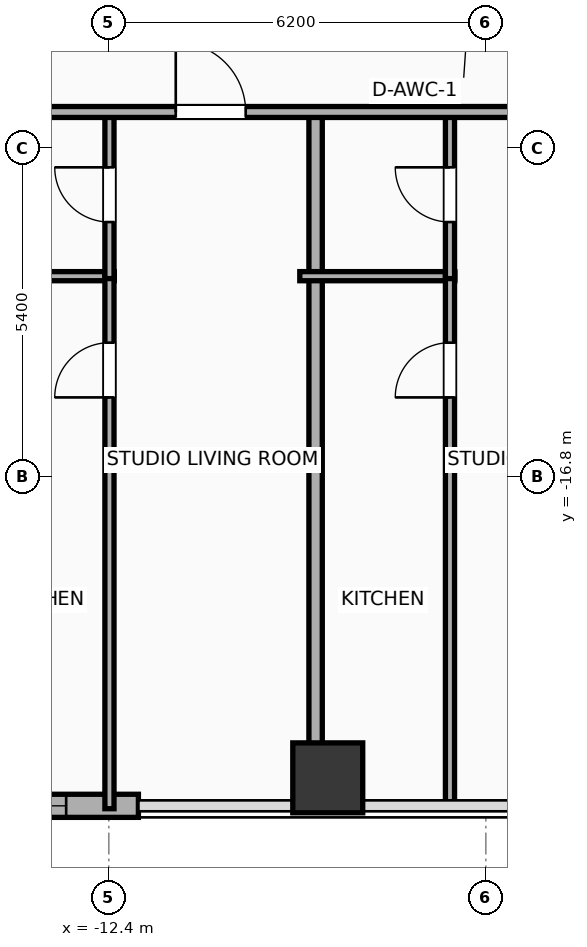
"""IFC4 building model, lengths in metres.
Left out: names, types, materials, properties, quantities, classifications, styles, units other than length and angle.
Written with IfcOpenShell. Run it as: python <this file> out.ifc"""

import sys

from ifc_helpers import new_model, si_unit, direction, frame, frame_2d, origin, origin_2d, place, context, subcontext, project, spatial, rectangle, hollow_rectangle, extrude, element, fill, save


model = new_model("IFC4")
c1 = context("Model", 3, precision=1e-05, world=origin(), true_north=direction((0.0, 1.0)))
c2 = subcontext(c1, "Body", "Model", "MODEL_VIEW")
j1 = project(units=[si_unit("LENGTHUNIT", "METRE"), si_unit("PLANEANGLEUNIT", "RADIAN")], contexts=[c1])
p1 = place(None, origin())
s1 = spatial("IfcSite", under=j1, at=p1, CompositionType="ELEMENT")
p2 = place(p1, origin())
s2 = spatial("IfcBuilding", under=s1, at=p2, CompositionType="ELEMENT")
p3 = place(p2, frame((0.0, 0.0, 61.1)))
s3 = spatial("IfcBuildingStorey", under=s2, at=p3, CompositionType="ELEMENT", Elevation=61.1)
p4 = place(p3, frame((-8.8, -21.75, 0.0), z_axis=(0.0, 0.0, 1.0), x_axis=(1.0, 0.0, 0.0)))
e1 = element("IfcColumn", 1, at=p4, inside=s3, PredefinedType="COLUMN", context=c2, shape_type="SweptSolid", body=[
    extrude(hollow_rectangle(XDim=1.15, YDim=1.15, WallThickness=0.04, at=origin_2d()), origin(), (0.0, 0.0, 1.0), 3.9),
])
p5 = place(p3, frame((-11.914, -22.21, 0.0), z_axis=(0.0, 0.0, 1.0), x_axis=(-1.0, 0.0, 0.0)))
e2 = element("IfcWall", 2, at=p5, inside=s3, PredefinedType="ELEMENTEDWALL", context=c2, shape_type="SweptSolid", body=[
    extrude(rectangle(XDim=17.667, YDim=0.38, at=frame_2d((8.833, 0.0))), origin(), (0.0, 0.0, 1.0), 3.65),
])
p6 = place(p5, frame((8.484, 0.0, 0.75)))
e3 = element("IfcOpeningElement", 3, at=p6, cuts=e2, PredefinedType="OPENING", context=c2, shape_type="SweptSolid", body=[
    extrude(rectangle(XDim=2.4, YDim=2.1, at=frame_2d((1.2, 1.05))), frame((0.0, 0.2, 0.0), z_axis=(0.0, -1.0, 0.0), x_axis=(1.0, 0.0, 0.0)), (0.0, 0.0, 1.0), 0.4),
])
p7 = place(p5, frame((14.732, 0.0, 0.75)))
e4 = element("IfcOpeningElement", 4, at=p7, cuts=e2, PredefinedType="OPENING", context=c2, shape_type="SweptSolid", body=[
    extrude(rectangle(XDim=1.2, YDim=2.05, at=frame_2d((0.6, 1.025))), frame((0.0, 0.2, 0.0), z_axis=(0.0, -1.0, 0.0), x_axis=(1.0, 0.0, 0.0)), (0.0, 0.0, 1.0), 0.4),
])
p8 = place(p5, frame((12.181, 0.0, 0.75)))
e5 = element("IfcOpeningElement", 5, at=p8, cuts=e2, PredefinedType="OPENING", context=c2, shape_type="SweptSolid", body=[
    extrude(rectangle(XDim=1.2, YDim=2.05, at=frame_2d((0.6, 1.025))), frame((0.0, 0.2, 0.0), z_axis=(0.0, -1.0, 0.0), x_axis=(1.0, 0.0, 0.0)), (0.0, 0.0, 1.0), 0.4),
])
p9 = place(p5, frame((4.886, 0.0, 0.75)))
e6 = element("IfcOpeningElement", 6, at=p9, cuts=e2, PredefinedType="OPENING", context=c2, shape_type="SweptSolid", body=[
    extrude(rectangle(XDim=1.2, YDim=2.05, at=frame_2d((0.6, 1.025))), frame((0.0, 0.2, 0.0), z_axis=(0.0, -1.0, 0.0), x_axis=(1.0, 0.0, 0.0)), (0.0, 0.0, 1.0), 0.4),
])
p10 = place(p5, frame((1.188, 0.0, 0.75)))
e7 = element("IfcOpeningElement", 7, at=p10, cuts=e2, PredefinedType="OPENING", context=c2, shape_type="SweptSolid", body=[
    extrude(rectangle(XDim=1.2, YDim=2.05, at=frame_2d((0.6, 1.025))), frame((0.0, 0.2, 0.0), z_axis=(0.0, -1.0, 0.0), x_axis=(1.0, 0.0, 0.0)), (0.0, 0.0, 1.0), 0.4),
])
p11 = place(p3, frame((-14.86, -13.5, 0.0), z_axis=(0.0, 0.0, 1.0), x_axis=(1.0, 0.0, 0.0)))
e8 = element("IfcWall", 8, at=p11, inside=s3, PredefinedType="PLUMBINGWALL", context=c2, shape_type="SweptSolid", body=[
    extrude(rectangle(XDim=2.55, YDim=0.15, at=frame_2d((1.275, 0.0))), origin(), (0.0, 0.0, 1.0), 3.65),
])
p12 = place(p3, frame((-12.39, -22.258, 0.0), z_axis=(0.0, 0.0, 1.0), x_axis=(0.0, 1.0, 0.0)))
e9 = element("IfcWall", 9, at=p12, inside=s3, PredefinedType="PLUMBINGWALL", context=c2, shape_type="SweptSolid", body=[
    extrude(rectangle(XDim=8.798, YDim=0.15, at=frame_2d((4.399, 0.0))), origin(), (0.0, 0.0, 1.0), 3.65),
])
p13 = place(p12, frame((6.764, 0.0, 0.0)))
e10 = element("IfcOpeningElement", 10, at=p13, cuts=e9, PredefinedType="OPENING", context=c2, shape_type="SweptSolid", body=[
    extrude(rectangle(XDim=0.9, YDim=2.05, at=frame_2d((0.45, 1.025))), frame((0.0, 0.085, 0.0), z_axis=(0.0, -1.0, 0.0), x_axis=(1.0, 0.0, 0.0)), (0.0, 0.0, 1.0), 0.17),
])
p14 = place(p3, frame((-12.39, -13.54, 0.0), z_axis=(0.0, 0.0, 1.0), x_axis=(0.0, 1.0, 0.0)))
e11 = element("IfcWall", 11, at=p14, inside=s3, PredefinedType="PLUMBINGWALL", context=c2, shape_type="SweptSolid", body=[
    extrude(rectangle(XDim=2.76, YDim=0.15, at=frame_2d((1.38, 0.0))), origin(), (0.0, 0.0, 1.0), 3.65),
])
p15 = place(p14, frame((0.93, 0.0, 0.0)))
e12 = element("IfcOpeningElement", 12, at=p15, cuts=e11, PredefinedType="OPENING", context=c2, shape_type="SweptSolid", body=[
    extrude(rectangle(XDim=0.9, YDim=2.05, at=frame_2d((0.45, 1.025))), frame((0.0, 0.085, 0.0), z_axis=(0.0, -1.0, 0.0), x_axis=(1.0, 0.0, 0.0)), (0.0, 0.0, 1.0), 0.17),
])
p16 = place(p3, frame((-9.0, -22.21, 0.0), z_axis=(0.0, 0.0, 1.0), x_axis=(0.0, 1.0, 0.0)))
e13 = element("IfcWall", 13, at=p16, inside=s3, PredefinedType="PARTITIONING", context=c2, shape_type="SweptSolid", body=[
    extrude(rectangle(XDim=11.49, YDim=0.22, at=frame_2d((5.745, 0.0))), origin(), (0.0, 0.0, 1.0), 2.94),
])
p17 = place(p3, frame((-9.26, -13.5, 0.0), z_axis=(0.0, 0.0, 1.0), x_axis=(1.0, 0.0, 0.0)))
e14 = element("IfcWall", 14, at=p17, inside=s3, PredefinedType="PLUMBINGWALL", context=c2, shape_type="SweptSolid", body=[
    extrude(rectangle(XDim=2.55, YDim=0.15, at=frame_2d((1.275, 0.0))), origin(), (0.0, 0.0, 1.0), 3.65),
])
p18 = place(p3, frame((-6.79, -22.258, 0.0), z_axis=(0.0, 0.0, 1.0), x_axis=(0.0, 1.0, 0.0)))
e15 = element("IfcWall", 15, at=p18, inside=s3, PredefinedType="PLUMBINGWALL", context=c2, shape_type="SweptSolid", body=[
    extrude(rectangle(XDim=8.798, YDim=0.15, at=frame_2d((4.399, 0.0))), origin(), (0.0, 0.0, 1.0), 3.65),
])
p19 = place(p18, frame((6.764, 0.0, 0.0)))
e16 = element("IfcOpeningElement", 16, at=p19, cuts=e15, PredefinedType="OPENING", context=c2, shape_type="SweptSolid", body=[
    extrude(rectangle(XDim=0.9, YDim=2.05, at=frame_2d((0.45, 1.025))), frame((0.0, 0.085, 0.0), z_axis=(0.0, -1.0, 0.0), x_axis=(1.0, 0.0, 0.0)), (0.0, 0.0, 1.0), 0.17),
])
p20 = place(p3, frame((-6.79, -13.54, 0.0), z_axis=(0.0, 0.0, 1.0), x_axis=(0.0, 1.0, 0.0)))
e17 = element("IfcWall", 17, at=p20, inside=s3, PredefinedType="PLUMBINGWALL", context=c2, shape_type="SweptSolid", body=[
    extrude(rectangle(XDim=2.76, YDim=0.15, at=frame_2d((1.38, 0.0))), origin(), (0.0, 0.0, 1.0), 3.65),
])
p21 = place(p20, frame((0.93, 0.0, 0.0)))
e18 = element("IfcOpeningElement", 18, at=p21, cuts=e17, PredefinedType="OPENING", context=c2, shape_type="SweptSolid", body=[
    extrude(rectangle(XDim=0.9, YDim=2.05, at=frame_2d((0.45, 1.025))), frame((0.0, 0.085, 0.0), z_axis=(0.0, -1.0, 0.0), x_axis=(1.0, 0.0, 0.0)), (0.0, 0.0, 1.0), 0.17),
])
p22 = place(p3, frame((-33.41, -10.8, 0.0), z_axis=(0.0, 0.0, 1.0), x_axis=(1.0, 0.0, 0.0)))
e19 = element("IfcWall", 19, at=p22, inside=s3, PredefinedType="PARTITIONING", context=c2, shape_type="SweptSolid", body=[
    extrude(rectangle(XDim=59.62, YDim=0.18, at=frame_2d((29.81, 0.0))), origin(), (0.0, 0.0, 1.0), 3.65),
])
p23 = place(p22, frame((3.36, 0.0, 0.0)))
e20 = element("IfcOpeningElement", 20, at=p23, cuts=e19, PredefinedType="OPENING", context=c2, shape_type="SweptSolid", body=[
    extrude(rectangle(XDim=1.15, YDim=2.05, at=frame_2d((0.575, 1.025))), frame((0.0, 0.1, 0.0), z_axis=(0.0, -1.0, 0.0), x_axis=(1.0, 0.0, 0.0)), (0.0, 0.0, 1.0), 0.2),
])
p24 = place(p22, frame((10.908, 0.0, 0.0)))
e21 = element("IfcOpeningElement", 21, at=p24, cuts=e19, PredefinedType="OPENING", context=c2, shape_type="SweptSolid", body=[
    extrude(rectangle(XDim=1.15, YDim=2.05, at=frame_2d((0.575, 1.025))), frame((0.0, 0.1, 0.0), z_axis=(0.0, -1.0, 0.0), x_axis=(1.0, 0.0, 0.0)), (0.0, 0.0, 1.0), 0.2),
])
p25 = place(p22, frame((15.755, 0.0, 0.0)))
e22 = element("IfcOpeningElement", 22, at=p25, cuts=e19, PredefinedType="OPENING", context=c2, shape_type="SweptSolid", body=[
    extrude(rectangle(XDim=0.9, YDim=2.05, at=frame_2d((0.45, 1.025))), frame((0.0, 0.1, 0.0), z_axis=(0.0, -1.0, 0.0), x_axis=(1.0, 0.0, 0.0)), (0.0, 0.0, 1.0), 0.2),
])
p26 = place(p22, frame((22.11, 0.0, 0.0)))
e23 = element("IfcOpeningElement", 23, at=p26, cuts=e19, PredefinedType="OPENING", context=c2, shape_type="SweptSolid", body=[
    extrude(rectangle(XDim=1.15, YDim=2.05, at=frame_2d((0.575, 1.025))), frame((0.0, 0.1, 0.0), z_axis=(0.0, -1.0, 0.0), x_axis=(1.0, 0.0, 0.0)), (0.0, 0.0, 1.0), 0.2),
])
p27 = place(p22, frame((27.709, 0.0, 0.0)))
e24 = element("IfcOpeningElement", 24, at=p27, cuts=e19, PredefinedType="OPENING", context=c2, shape_type="SweptSolid", body=[
    extrude(rectangle(XDim=1.15, YDim=2.05, at=frame_2d((0.575, 1.025))), frame((0.0, 0.1, 0.0), z_axis=(0.0, -1.0, 0.0), x_axis=(1.0, 0.0, 0.0)), (0.0, 0.0, 1.0), 0.2),
])
p28 = place(p22, frame((33.349, 0.0, 0.0)))
e25 = element("IfcOpeningElement", 25, at=p28, cuts=e19, PredefinedType="OPENING", context=c2, shape_type="SweptSolid", body=[
    extrude(rectangle(XDim=1.15, YDim=2.05, at=frame_2d((0.575, 1.025))), frame((0.0, 0.1, 0.0), z_axis=(0.0, -1.0, 0.0), x_axis=(1.0, 0.0, 0.0)), (0.0, 0.0, 1.0), 0.2),
])
p29 = place(p22, frame((36.759, 0.0, 0.0)))
e26 = element("IfcOpeningElement", 26, at=p29, cuts=e19, PredefinedType="OPENING", context=c2, shape_type="SweptSolid", body=[
    extrude(rectangle(XDim=1.15, YDim=2.05, at=frame_2d((0.575, 1.025))), frame((0.0, 0.1, 0.0), z_axis=(0.0, -1.0, 0.0), x_axis=(1.0, 0.0, 0.0)), (0.0, 0.0, 1.0), 0.2),
])
p30 = place(p22, frame((43.752, 0.0, 0.0)))
e27 = element("IfcOpeningElement", 27, at=p30, cuts=e19, PredefinedType="OPENING", context=c2, shape_type="SweptSolid", body=[
    extrude(rectangle(XDim=0.9, YDim=2.05, at=frame_2d((0.45, 1.025))), frame((0.0, 0.1, 0.0), z_axis=(0.0, -1.0, 0.0), x_axis=(1.0, 0.0, 0.0)), (0.0, 0.0, 1.0), 0.2),
])
p31 = place(p22, frame((47.962, 0.0, 0.0)))
e28 = element("IfcOpeningElement", 28, at=p31, cuts=e19, PredefinedType="OPENING", context=c2, shape_type="SweptSolid", body=[
    extrude(rectangle(XDim=1.15, YDim=2.05, at=frame_2d((0.575, 1.025))), frame((0.0, 0.1, 0.0), z_axis=(0.0, -1.0, 0.0), x_axis=(1.0, 0.0, 0.0)), (0.0, 0.0, 1.0), 0.2),
])
p32 = place(p22, frame((55.641, 0.0, 0.0)))
e29 = element("IfcOpeningElement", 29, at=p32, cuts=e19, PredefinedType="OPENING", context=c2, shape_type="SweptSolid", body=[
    extrude(rectangle(XDim=1.15, YDim=2.05, at=frame_2d((0.575, 1.025))), frame((0.0, 0.1, 0.0), z_axis=(0.0, -1.0, 0.0), x_axis=(1.0, 0.0, 0.0)), (0.0, 0.0, 1.0), 0.2),
])
p33 = place(p10, origin())
e30 = element("IfcWindow", 30, at=p33, inside=s3, PartitioningType="SINGLE_PANEL", PredefinedType="WINDOW", context=c2, shape_type="SweptSolid", body=[
    extrude(rectangle(XDim=1.2, YDim=2.05, at=frame_2d((0.6, 1.025))), frame((0.0, 0.03, 0.0), z_axis=(0.0, -1.0, 0.0), x_axis=(1.0, 0.0, 0.0)), (0.0, 0.0, 1.0), 0.06),
])
fill(e7, e30)
p34 = place(p13, origin())
e31 = element("IfcDoor", 31, at=p34, inside=s3, OperationType="SINGLE_SWING_LEFT", PredefinedType="DOOR", context=c2, shape_type="SweptSolid", body=[
    extrude(rectangle(XDim=0.9, YDim=2.05, at=frame_2d((0.45, 1.025))), frame((0.0, 0.025, 0.0), z_axis=(0.0, -1.0, 0.0), x_axis=(1.0, 0.0, 0.0)), (0.0, 0.0, 1.0), 0.05),
])
fill(e10, e31)
p35 = place(p15, origin())
e32 = element("IfcDoor", 32, at=p35, inside=s3, OperationType="SINGLE_SWING_RIGHT", PredefinedType="DOOR", context=c2, shape_type="SweptSolid", body=[
    extrude(rectangle(XDim=0.9, YDim=2.05, at=frame_2d((0.45, 1.025))), frame((0.0, 0.025, 0.0), z_axis=(0.0, -1.0, 0.0), x_axis=(1.0, 0.0, 0.0)), (0.0, 0.0, 1.0), 0.05),
])
fill(e12, e32)
p36 = place(p19, origin())
e33 = element("IfcDoor", 33, at=p36, inside=s3, OperationType="SINGLE_SWING_LEFT", PredefinedType="DOOR", context=c2, shape_type="SweptSolid", body=[
    extrude(rectangle(XDim=0.9, YDim=2.05, at=frame_2d((0.45, 1.025))), frame((0.0, 0.025, 0.0), z_axis=(0.0, -1.0, 0.0), x_axis=(1.0, 0.0, 0.0)), (0.0, 0.0, 1.0), 0.05),
])
fill(e16, e33)
p37 = place(p21, origin())
e34 = element("IfcDoor", 34, at=p37, inside=s3, OperationType="SINGLE_SWING_RIGHT", PredefinedType="DOOR", context=c2, shape_type="SweptSolid", body=[
    extrude(rectangle(XDim=0.9, YDim=2.05, at=frame_2d((0.45, 1.025))), frame((0.0, 0.025, 0.0), z_axis=(0.0, -1.0, 0.0), x_axis=(1.0, 0.0, 0.0)), (0.0, 0.0, 1.0), 0.05),
])
fill(e18, e34)
p38 = place(p26, origin())
e35 = element("IfcDoor", 35, at=p38, inside=s3, OperationType="SINGLE_SWING_LEFT", PredefinedType="DOOR", context=c2, shape_type="SweptSolid", body=[
    extrude(rectangle(XDim=1.15, YDim=2.05, at=frame_2d((0.575, 1.025))), frame((0.0, 0.025, 0.0), z_axis=(0.0, -1.0, 0.0), x_axis=(1.0, 0.0, 0.0)), (0.0, 0.0, 1.0), 0.05),
])
fill(e23, e35)
save(model, sys.argv[1])
